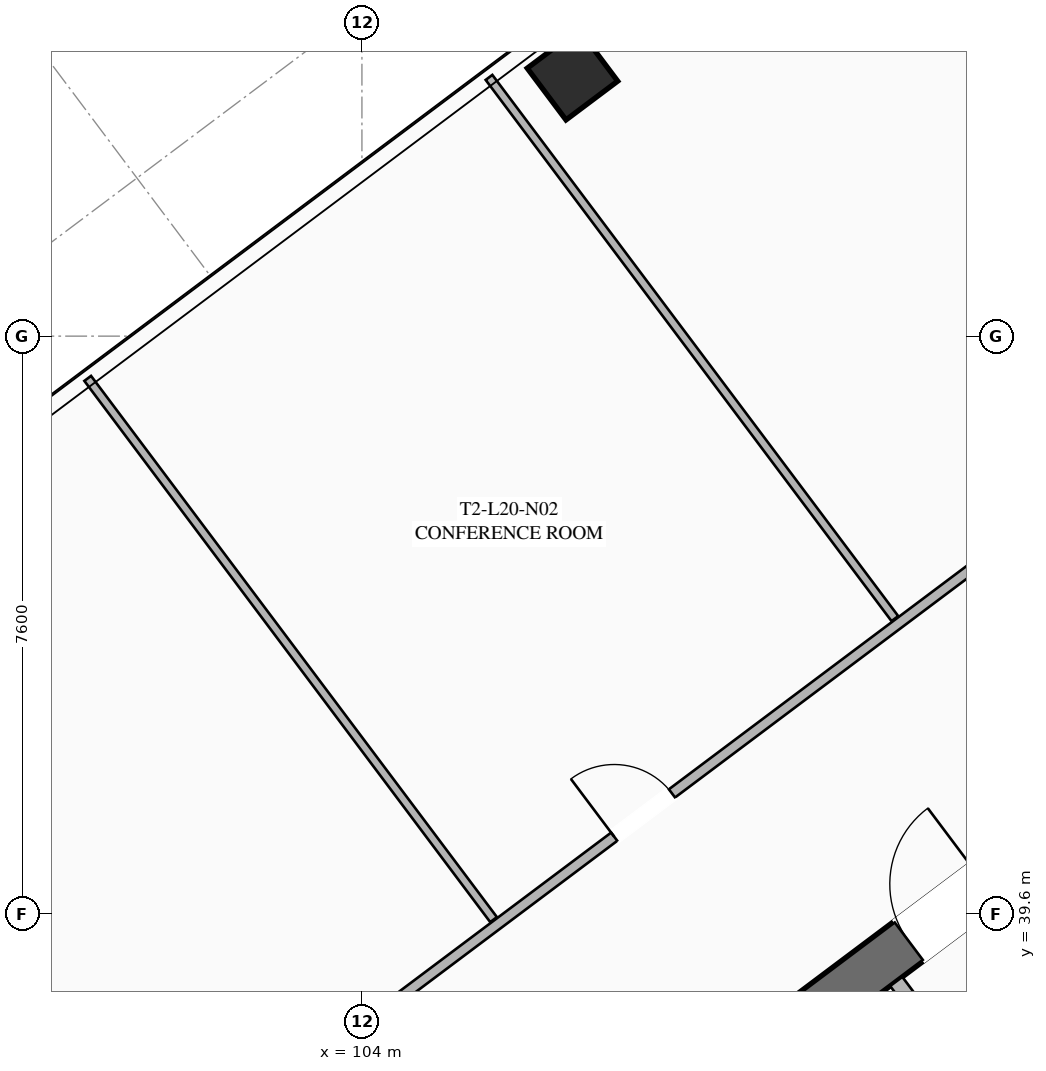
"""IFC4 building model, lengths in metres.
Left out: names, types, materials, properties, quantities, classifications, styles, units other than length and angle.
Written with IfcOpenShell. Run it as: python <this file> out.ifc"""

import sys

from ifc_helpers import new_model, si_unit, direction, frame, frame_2d, origin, origin_2d, place, context, subcontext, project, spatial, rectangle, hollow_rectangle, extrude, element, fill, save


model = new_model("IFC4")
c1 = context("Model", 3, precision=1e-05, world=origin(), true_north=direction((0.0, 1.0)))
c2 = subcontext(c1, "Body", "Model", "MODEL_VIEW")
j1 = project(units=[si_unit("LENGTHUNIT", "METRE"), si_unit("PLANEANGLEUNIT", "RADIAN")], contexts=[c1])
p1 = place(None, origin())
s1 = spatial("IfcSite", under=j1, at=p1, CompositionType="ELEMENT")
p2 = place(p1, origin())
s2 = spatial("IfcBuilding", under=s1, at=p2, CompositionType="ELEMENT")
p3 = place(p2, frame((0.0, 0.0, 77.85)))
s3 = spatial("IfcBuildingStorey", under=s2, at=p3, CompositionType="ELEMENT", Elevation=77.85)
p4 = place(p3, frame((103.571, 33.522, 0.0), z_axis=(0.0, 0.0, 1.0), x_axis=(0.799998028465, 0.600002628705, 0.0)))
e1 = element("IfcWall", 1, at=p4, inside=s3, PredefinedType="SHEAR", context=c2, shape_type="SweptSolid", body=[
    extrude(rectangle(XDim=14.86, YDim=0.65, at=frame_2d((7.43, 0.0))), origin(), (0.0, 0.0, 1.0), 3.55),
])
p5 = place(p4, frame((4.48, 0.0, 0.0)))
e2 = element("IfcOpeningElement", 2, at=p5, cuts=e1, PredefinedType="OPENING", context=c2, shape_type="SweptSolid", body=[
    extrude(rectangle(XDim=1.25, YDim=2.25, at=frame_2d((0.625, 1.125))), frame((0.0, 0.335, 0.0), z_axis=(0.0, -1.0, 0.0), x_axis=(1.0, 0.0, 0.0)), (0.0, 0.0, 1.0), 0.67),
])
p6 = place(p4, frame((9.53, 0.0, 0.0)))
e3 = element("IfcOpeningElement", 3, at=p6, cuts=e1, PredefinedType="OPENING", context=c2, shape_type="SweptSolid", body=[
    extrude(rectangle(XDim=1.25, YDim=2.25, at=frame_2d((0.625, 1.125))), frame((0.0, 0.335, 0.0), z_axis=(0.0, -1.0, 0.0), x_axis=(1.0, 0.0, 0.0)), (0.0, 0.0, 1.0), 0.67),
])
p7 = place(p3, frame((106.77, 50.64, 0.0), z_axis=(0.0, 0.0, 1.0), x_axis=(0.799999996291, 0.600000004945, 0.0)))
e4 = element("IfcColumn", 4, at=p7, inside=s3, PredefinedType="COLUMN", context=c2, shape_type="SweptSolid", body=[
    extrude(hollow_rectangle(XDim=0.85, YDim=0.85, WallThickness=0.035, at=origin_2d()), origin(), (0.0, 0.0, 1.0), 3.35),
])
p8 = place(p3, frame((115.11, 33.27, 0.0), z_axis=(0.0, 0.0, 1.0), x_axis=(-0.600011488909, 0.79999138319, 0.0)))
e5 = element("IfcWall", 5, at=p8, inside=s3, PredefinedType="SOLIDWALL", context=c2, shape_type="SweptSolid", body=[
    extrude(rectangle(XDim=6.8, YDim=0.2, at=frame_2d((3.4, 0.0))), origin(), (0.0, 0.0, 1.0), 3.35),
])
p9 = place(p3, frame((98.516, 34.012, 0.0), z_axis=(0.0, 0.0, 1.0), x_axis=(0.8, 0.6, 0.0)))
e6 = element("IfcWall", 6, at=p9, inside=s3, PredefinedType="PARTITIONING", context=c2, shape_type="SweptSolid", body=[
    extrude(rectangle(XDim=28.23, YDim=0.135, at=frame_2d((14.115, 0.0))), origin(), (0.0, 0.0, 1.0), 2.703),
])
p10 = place(p9, frame((0.3, 0.0, 0.0)))
e7 = element("IfcOpeningElement", 7, at=p10, cuts=e6, PredefinedType="OPENING", context=c2, shape_type="SweptSolid", body=[
    extrude(rectangle(XDim=0.95, YDim=2.05, at=frame_2d((0.475, 1.025))), frame((0.0, 0.077, 0.0), z_axis=(0.0, -1.0, 0.0), x_axis=(1.0, 0.0, 0.0)), (0.0, 0.0, 1.0), 0.155),
])
p11 = place(p9, frame((11.004, 0.0, 0.0)))
e8 = element("IfcOpeningElement", 8, at=p11, cuts=e6, PredefinedType="OPENING", context=c2, shape_type="SweptSolid", body=[
    extrude(rectangle(XDim=0.95, YDim=2.05, at=frame_2d((0.475, 1.025))), frame((0.0, 0.077, 0.0), z_axis=(0.0, -1.0, 0.0), x_axis=(1.0, 0.0, 0.0)), (0.0, 0.0, 1.0), 0.155),
])
p12 = place(p9, frame((26.98, 0.0, 0.0)))
e9 = element("IfcOpeningElement", 9, at=p12, cuts=e6, PredefinedType="OPENING", context=c2, shape_type="SweptSolid", body=[
    extrude(rectangle(XDim=0.95, YDim=2.05, at=frame_2d((0.475, 1.025))), frame((0.0, 0.077, 0.0), z_axis=(0.0, -1.0, 0.0), x_axis=(1.0, 0.0, 0.0)), (0.0, 0.0, 1.0), 0.155),
])
for number, where, z_axis, x_axis in (
    (10, (105.732, 39.524, 0.0), (0.0, 0.0, 1.0), (-0.6, 0.8, 0.0)),
    (11, (111.012, 43.484, 0.0), (0.0, 0.0, 1.0), (-0.6, 0.8, 0.0)),
):
    element("IfcWall", number, at=place(p3, frame(where, z_axis=z_axis, x_axis=x_axis)), inside=s3, PredefinedType="PARTITIONING", context=c2, shape_type="SweptSolid", body=[
        extrude(rectangle(XDim=8.9, YDim=0.11, at=frame_2d((4.45, 0.0))), origin(), (0.0, 0.0, 1.0), 2.703),
    ])
p13 = place(p6, origin())
e12 = element("IfcDoor", 12, at=p13, inside=s3, OperationType="SINGLE_SWING_RIGHT", PredefinedType="DOOR", context=c2, shape_type="SweptSolid", body=[
    extrude(rectangle(XDim=1.25, YDim=2.25, at=frame_2d((0.625, 1.125))), frame((0.0, 0.025, 0.0), z_axis=(0.0, -1.0, 0.0), x_axis=(1.0, 0.0, 0.0)), (0.0, 0.0, 1.0), 0.05),
])
fill(e3, e12)
p14 = place(p11, origin())
e13 = element("IfcDoor", 13, at=p14, inside=s3, OperationType="SINGLE_SWING_LEFT", PredefinedType="DOOR", context=c2, shape_type="SweptSolid", body=[
    extrude(rectangle(XDim=0.95, YDim=2.05, at=frame_2d((0.475, 1.025))), frame((0.0, 0.025, 0.0), z_axis=(0.0, -1.0, 0.0), x_axis=(1.0, 0.0, 0.0)), (0.0, 0.0, 1.0), 0.05),
])
fill(e8, e13)
save(model, sys.argv[1])
